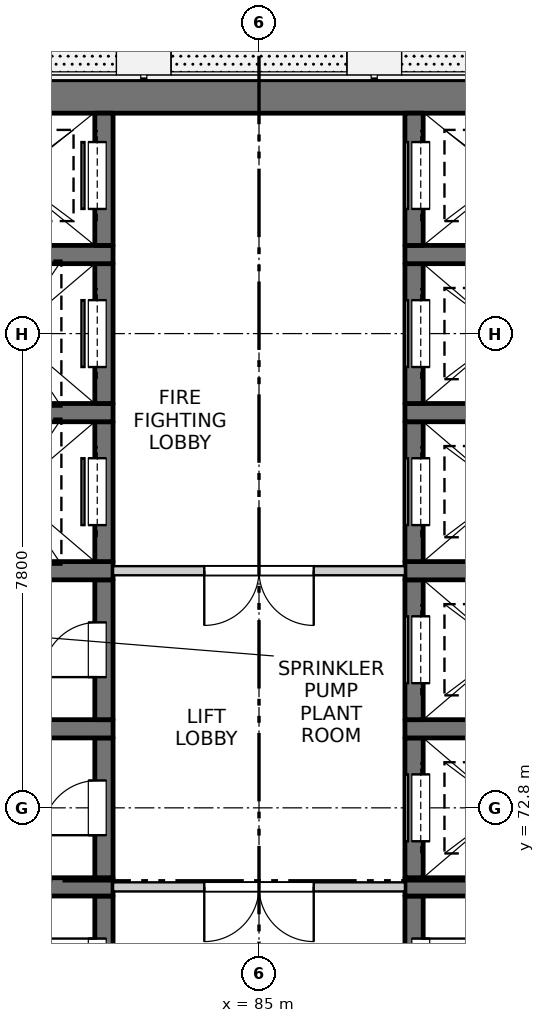
"""IFC4 building model, lengths in metres.
Left out: names, types, materials, properties, quantities, classifications, styles, units other than length and angle.
Written with IfcOpenShell. Run it as: python <this file> out.ifc"""

import sys

from ifc_helpers import new_model, si_unit, direction, frame, frame_2d, origin, place, context, subcontext, project, spatial, rectangle, extrude, element, fill, save


model = new_model("IFC4")
c1 = context("Model", 3, precision=1e-05, world=origin(), true_north=direction((0.0, 1.0)))
c2 = subcontext(c1, "Body", "Model", "MODEL_VIEW")
j1 = project(units=[si_unit("LENGTHUNIT", "METRE"), si_unit("PLANEANGLEUNIT", "RADIAN")], contexts=[c1])
p1 = place(None, origin())
s1 = spatial("IfcSite", under=j1, at=p1, CompositionType="ELEMENT")
p2 = place(p1, origin())
s2 = spatial("IfcBuilding", under=s1, at=p2, CompositionType="ELEMENT")
p3 = place(p2, frame((0.0, 0.0, 192.8)))
s3 = spatial("IfcBuildingStorey", under=s2, at=p3, CompositionType="ELEMENT", Elevation=192.8)
p4 = place(p3, frame((75.525, 84.5, -0.3), z_axis=(0.0, 0.0, 1.0), x_axis=(1.0, 0.0, 0.0)))
e1 = element("IfcWall", 1, at=p4, inside=s3, PredefinedType="SOLIDWALL", context=c2, shape_type="SweptSolid", body=[
    extrude(rectangle(XDim=18.95, YDim=0.55, at=frame_2d((9.475, 0.0))), origin(), (0.0, 0.0, 1.0), 4.5),
])
p5 = place(p3, frame((82.45, 69.05, -0.3), z_axis=(0.0, 0.0, 1.0), x_axis=(0.0, 1.0, 0.0)))
e2 = element("IfcWall", 2, at=p5, inside=s3, PredefinedType="SOLIDWALL", context=c2, shape_type="SweptSolid", body=[
    extrude(rectangle(XDim=2.3, YDim=0.3, at=frame_2d((1.15, 0.0))), origin(), (0.0, 0.0, 1.0), 4.5),
])
p6 = place(p5, frame((0.7, 0.0, 0.3)))
e3 = element("IfcOpeningElement", 3, at=p6, cuts=e2, PredefinedType="OPENING", context=c2, shape_type="SweptSolid", body=[
    extrude(rectangle(XDim=0.9, YDim=2.1, at=frame_2d((0.45, 1.05))), frame((0.0, 0.16, 0.0), z_axis=(0.0, -1.0, 0.0), x_axis=(1.0, 0.0, 0.0)), (0.0, 0.0, 1.0), 0.32),
])
p7 = place(p3, frame((79.6, 71.5, -0.3), z_axis=(0.0, 0.0, 1.0), x_axis=(1.0, 0.0, 0.0)))
e4 = element("IfcWall", 4, at=p7, inside=s3, PredefinedType="SOLIDWALL", context=c2, shape_type="SweptSolid", body=[
    extrude(rectangle(XDim=3.0, YDim=0.3, at=frame_2d((1.5, 0.0))), origin(), (0.0, 0.0, 1.0), 4.5),
])
p8 = place(p3, frame((82.45, 71.65, -0.3), z_axis=(0.0, 0.0, 1.0), x_axis=(0.0, 1.0, 0.0)))
e5 = element("IfcWall", 5, at=p8, inside=s3, PredefinedType="SOLIDWALL", context=c2, shape_type="SweptSolid", body=[
    extrude(rectangle(XDim=2.3, YDim=0.3, at=frame_2d((1.15, 0.0))), origin(), (0.0, 0.0, 1.0), 4.5),
])
p9 = place(p8, frame((0.7, 0.0, 0.3)))
e6 = element("IfcOpeningElement", 6, at=p9, cuts=e5, PredefinedType="OPENING", context=c2, shape_type="SweptSolid", body=[
    extrude(rectangle(XDim=0.9, YDim=2.1, at=frame_2d((0.45, 1.05))), frame((0.0, 0.16, 0.0), z_axis=(0.0, -1.0, 0.0), x_axis=(1.0, 0.0, 0.0)), (0.0, 0.0, 1.0), 0.32),
])
p10 = place(p3, frame((79.6, 74.1, -0.3), z_axis=(0.0, 0.0, 1.0), x_axis=(1.0, 0.0, 0.0)))
e7 = element("IfcWall", 7, at=p10, inside=s3, PredefinedType="SOLIDWALL", context=c2, shape_type="SweptSolid", body=[
    extrude(rectangle(XDim=3.0, YDim=0.3, at=frame_2d((1.5, 0.0))), origin(), (0.0, 0.0, 1.0), 4.5),
])
p11 = place(p3, frame((82.45, 74.25, -0.3), z_axis=(0.0, 0.0, 1.0), x_axis=(0.0, 1.0, 0.0)))
e8 = element("IfcWall", 8, at=p11, inside=s3, PredefinedType="SOLIDWALL", context=c2, shape_type="SweptSolid", body=[
    extrude(rectangle(XDim=2.3, YDim=0.3, at=frame_2d((1.15, 0.0))), origin(), (0.0, 0.0, 1.0), 4.5),
])
p12 = place(p11, frame((0.7, 0.0, 0.3)))
e9 = element("IfcOpeningElement", 9, at=p12, cuts=e8, PredefinedType="OPENING", context=c2, shape_type="SweptSolid", body=[
    extrude(rectangle(XDim=0.9, YDim=2.1, at=frame_2d((0.45, 1.05))), frame((0.0, 0.16, 0.0), z_axis=(0.0, -1.0, 0.0), x_axis=(1.0, 0.0, 0.0)), (0.0, 0.0, 1.0), 0.32),
])
p13 = place(p3, frame((79.6, 76.7, -0.3), z_axis=(0.0, 0.0, 1.0), x_axis=(1.0, 0.0, 0.0)))
e10 = element("IfcWall", 10, at=p13, inside=s3, PredefinedType="SOLIDWALL", context=c2, shape_type="SweptSolid", body=[
    extrude(rectangle(XDim=3.0, YDim=0.3, at=frame_2d((1.5, 0.0))), origin(), (0.0, 0.0, 1.0), 4.5),
])
p14 = place(p3, frame((82.45, 76.85, -0.3), z_axis=(0.0, 0.0, 1.0), x_axis=(0.0, 1.0, 0.0)))
e11 = element("IfcWall", 11, at=p14, inside=s3, PredefinedType="SOLIDWALL", context=c2, shape_type="SweptSolid", body=[
    extrude(rectangle(XDim=2.3, YDim=0.3, at=frame_2d((1.15, 0.0))), origin(), (0.0, 0.0, 1.0), 4.5),
])
p15 = place(p14, frame((0.6, 0.0, 0.3)))
e12 = element("IfcOpeningElement", 12, at=p15, cuts=e11, PredefinedType="OPENING", context=c2, shape_type="SweptSolid", body=[
    extrude(rectangle(XDim=1.1, YDim=2.1, at=frame_2d((0.55, 1.05))), frame((0.0, 0.16, 0.0), z_axis=(0.0, -1.0, 0.0), x_axis=(1.0, 0.0, 0.0)), (0.0, 0.0, 1.0), 0.32),
])
p16 = place(p3, frame((79.6, 79.3, -0.3), z_axis=(0.0, 0.0, 1.0), x_axis=(1.0, 0.0, 0.0)))
e13 = element("IfcWall", 13, at=p16, inside=s3, PredefinedType="SOLIDWALL", context=c2, shape_type="SweptSolid", body=[
    extrude(rectangle(XDim=3.0, YDim=0.3, at=frame_2d((1.5, 0.0))), origin(), (0.0, 0.0, 1.0), 4.5),
])
p17 = place(p3, frame((82.45, 79.45, -0.3), z_axis=(0.0, 0.0, 1.0), x_axis=(0.0, 1.0, 0.0)))
e14 = element("IfcWall", 14, at=p17, inside=s3, PredefinedType="SOLIDWALL", context=c2, shape_type="SweptSolid", body=[
    extrude(rectangle(XDim=2.3, YDim=0.3, at=frame_2d((1.15, 0.0))), origin(), (0.0, 0.0, 1.0), 4.5),
])
p18 = place(p17, frame((0.6, 0.0, 0.3)))
e15 = element("IfcOpeningElement", 15, at=p18, cuts=e14, PredefinedType="OPENING", context=c2, shape_type="SweptSolid", body=[
    extrude(rectangle(XDim=1.1, YDim=2.1, at=frame_2d((0.55, 1.05))), frame((0.0, 0.16, 0.0), z_axis=(0.0, -1.0, 0.0), x_axis=(1.0, 0.0, 0.0)), (0.0, 0.0, 1.0), 0.32),
])
p19 = place(p3, frame((79.6, 81.9, -0.3), z_axis=(0.0, 0.0, 1.0), x_axis=(1.0, 0.0, 0.0)))
e16 = element("IfcWall", 16, at=p19, inside=s3, PredefinedType="SOLIDWALL", context=c2, shape_type="SweptSolid", body=[
    extrude(rectangle(XDim=3.0, YDim=0.3, at=frame_2d((1.5, 0.0))), origin(), (0.0, 0.0, 1.0), 4.5),
])
p20 = place(p3, frame((82.45, 82.05, -0.3), z_axis=(0.0, 0.0, 1.0), x_axis=(0.0, 1.0, 0.0)))
e17 = element("IfcWall", 17, at=p20, inside=s3, PredefinedType="SOLIDWALL", context=c2, shape_type="SweptSolid", body=[
    extrude(rectangle(XDim=2.175, YDim=0.3, at=frame_2d((1.087, 0.0))), origin(), (0.0, 0.0, 1.0), 4.5),
])
p21 = place(p20, frame((0.6, 0.0, 0.3)))
e18 = element("IfcOpeningElement", 18, at=p21, cuts=e17, PredefinedType="OPENING", context=c2, shape_type="SweptSolid", body=[
    extrude(rectangle(XDim=1.1, YDim=2.1, at=frame_2d((0.55, 1.05))), frame((0.0, 0.16, 0.0), z_axis=(0.0, -1.0, 0.0), x_axis=(1.0, 0.0, 0.0)), (0.0, 0.0, 1.0), 0.32),
])
p22 = place(p3, frame((87.55, 69.05, -0.3), z_axis=(0.0, 0.0, 1.0), x_axis=(0.0, 1.0, 0.0)))
e19 = element("IfcWall", 19, at=p22, inside=s3, PredefinedType="SOLIDWALL", context=c2, shape_type="SweptSolid", body=[
    extrude(rectangle(XDim=2.3, YDim=0.3, at=frame_2d((1.15, 0.0))), origin(), (0.0, 0.0, 1.0), 4.5),
])
p23 = place(p22, frame((0.7, 0.0, 0.3)))
e20 = element("IfcOpeningElement", 20, at=p23, cuts=e19, PredefinedType="OPENING", context=c2, shape_type="SweptSolid", body=[
    extrude(rectangle(XDim=0.9, YDim=2.1, at=frame_2d((0.45, 1.05))), frame((0.0, 0.16, 0.0), z_axis=(0.0, -1.0, 0.0), x_axis=(1.0, 0.0, 0.0)), (0.0, 0.0, 1.0), 0.32),
])
p24 = place(p3, frame((87.4, 71.5, -0.3), z_axis=(0.0, 0.0, 1.0), x_axis=(1.0, 0.0, 0.0)))
e21 = element("IfcWall", 21, at=p24, inside=s3, PredefinedType="SOLIDWALL", context=c2, shape_type="SweptSolid", body=[
    extrude(rectangle(XDim=3.0, YDim=0.3, at=frame_2d((1.5, 0.0))), origin(), (0.0, 0.0, 1.0), 4.5),
])
p25 = place(p3, frame((87.55, 71.65, -0.3), z_axis=(0.0, 0.0, 1.0), x_axis=(0.0, 1.0, 0.0)))
e22 = element("IfcWall", 22, at=p25, inside=s3, PredefinedType="SOLIDWALL", context=c2, shape_type="SweptSolid", body=[
    extrude(rectangle(XDim=2.3, YDim=0.3, at=frame_2d((1.15, 0.0))), origin(), (0.0, 0.0, 1.0), 4.5),
])
p26 = place(p25, frame((0.6, 0.0, 0.3)))
e23 = element("IfcOpeningElement", 23, at=p26, cuts=e22, PredefinedType="OPENING", context=c2, shape_type="SweptSolid", body=[
    extrude(rectangle(XDim=1.1, YDim=2.1, at=frame_2d((0.55, 1.05))), frame((0.0, 0.16, 0.0), z_axis=(0.0, -1.0, 0.0), x_axis=(1.0, 0.0, 0.0)), (0.0, 0.0, 1.0), 0.32),
])
p27 = place(p3, frame((87.4, 74.1, -0.3), z_axis=(0.0, 0.0, 1.0), x_axis=(1.0, 0.0, 0.0)))
e24 = element("IfcWall", 24, at=p27, inside=s3, PredefinedType="SOLIDWALL", context=c2, shape_type="SweptSolid", body=[
    extrude(rectangle(XDim=3.0, YDim=0.3, at=frame_2d((1.5, 0.0))), origin(), (0.0, 0.0, 1.0), 4.5),
])
p28 = place(p3, frame((87.55, 74.25, -0.3), z_axis=(0.0, 0.0, 1.0), x_axis=(0.0, 1.0, 0.0)))
e25 = element("IfcWall", 25, at=p28, inside=s3, PredefinedType="SOLIDWALL", context=c2, shape_type="SweptSolid", body=[
    extrude(rectangle(XDim=2.3, YDim=0.3, at=frame_2d((1.15, 0.0))), origin(), (0.0, 0.0, 1.0), 4.5),
])
p29 = place(p28, frame((0.6, 0.0, 0.3)))
e26 = element("IfcOpeningElement", 26, at=p29, cuts=e25, PredefinedType="OPENING", context=c2, shape_type="SweptSolid", body=[
    extrude(rectangle(XDim=1.1, YDim=2.1, at=frame_2d((0.55, 1.05))), frame((0.0, 0.16, 0.0), z_axis=(0.0, -1.0, 0.0), x_axis=(1.0, 0.0, 0.0)), (0.0, 0.0, 1.0), 0.32),
])
p30 = place(p3, frame((87.4, 76.7, -0.3), z_axis=(0.0, 0.0, 1.0), x_axis=(1.0, 0.0, 0.0)))
e27 = element("IfcWall", 27, at=p30, inside=s3, PredefinedType="SOLIDWALL", context=c2, shape_type="SweptSolid", body=[
    extrude(rectangle(XDim=3.0, YDim=0.3, at=frame_2d((1.5, 0.0))), origin(), (0.0, 0.0, 1.0), 4.5),
])
p31 = place(p3, frame((87.55, 76.85, -0.3), z_axis=(0.0, 0.0, 1.0), x_axis=(0.0, 1.0, 0.0)))
e28 = element("IfcWall", 28, at=p31, inside=s3, PredefinedType="SOLIDWALL", context=c2, shape_type="SweptSolid", body=[
    extrude(rectangle(XDim=2.3, YDim=0.3, at=frame_2d((1.15, 0.0))), origin(), (0.0, 0.0, 1.0), 4.5),
])
p32 = place(p31, frame((0.6, 0.0, 0.3)))
e29 = element("IfcOpeningElement", 29, at=p32, cuts=e28, PredefinedType="OPENING", context=c2, shape_type="SweptSolid", body=[
    extrude(rectangle(XDim=1.1, YDim=2.1, at=frame_2d((0.55, 1.05))), frame((0.0, 0.16, 0.0), z_axis=(0.0, -1.0, 0.0), x_axis=(1.0, 0.0, 0.0)), (0.0, 0.0, 1.0), 0.32),
])
p33 = place(p3, frame((87.4, 79.3, -0.3), z_axis=(0.0, 0.0, 1.0), x_axis=(1.0, 0.0, 0.0)))
e30 = element("IfcWall", 30, at=p33, inside=s3, PredefinedType="SOLIDWALL", context=c2, shape_type="SweptSolid", body=[
    extrude(rectangle(XDim=3.0, YDim=0.3, at=frame_2d((1.5, 0.0))), origin(), (0.0, 0.0, 1.0), 4.5),
])
p34 = place(p3, frame((87.55, 79.45, -0.3), z_axis=(0.0, 0.0, 1.0), x_axis=(0.0, 1.0, 0.0)))
e31 = element("IfcWall", 31, at=p34, inside=s3, PredefinedType="SOLIDWALL", context=c2, shape_type="SweptSolid", body=[
    extrude(rectangle(XDim=2.3, YDim=0.3, at=frame_2d((1.15, 0.0))), origin(), (0.0, 0.0, 1.0), 4.5),
])
p35 = place(p34, frame((0.6, 0.0, 0.3)))
e32 = element("IfcOpeningElement", 32, at=p35, cuts=e31, PredefinedType="OPENING", context=c2, shape_type="SweptSolid", body=[
    extrude(rectangle(XDim=1.1, YDim=2.1, at=frame_2d((0.55, 1.05))), frame((0.0, 0.16, 0.0), z_axis=(0.0, -1.0, 0.0), x_axis=(1.0, 0.0, 0.0)), (0.0, 0.0, 1.0), 0.32),
])
p36 = place(p3, frame((87.4, 81.9, -0.3), z_axis=(0.0, 0.0, 1.0), x_axis=(1.0, 0.0, 0.0)))
e33 = element("IfcWall", 33, at=p36, inside=s3, PredefinedType="SOLIDWALL", context=c2, shape_type="SweptSolid", body=[
    extrude(rectangle(XDim=3.0, YDim=0.3, at=frame_2d((1.5, 0.0))), origin(), (0.0, 0.0, 1.0), 4.5),
])
p37 = place(p3, frame((87.55, 82.05, -0.3), z_axis=(0.0, 0.0, 1.0), x_axis=(0.0, 1.0, 0.0)))
e34 = element("IfcWall", 34, at=p37, inside=s3, PredefinedType="SOLIDWALL", context=c2, shape_type="SweptSolid", body=[
    extrude(rectangle(XDim=2.175, YDim=0.3, at=frame_2d((1.087, 0.0))), origin(), (0.0, 0.0, 1.0), 4.5),
])
p38 = place(p37, frame((0.6, 0.0, 0.3)))
e35 = element("IfcOpeningElement", 35, at=p38, cuts=e34, PredefinedType="OPENING", context=c2, shape_type="SweptSolid", body=[
    extrude(rectangle(XDim=1.1, YDim=2.1, at=frame_2d((0.55, 1.05))), frame((0.0, 0.16, 0.0), z_axis=(0.0, -1.0, 0.0), x_axis=(1.0, 0.0, 0.0)), (0.0, 0.0, 1.0), 0.32),
])
p39 = place(p3, frame((82.6, 71.5, 0.0), z_axis=(0.0, 0.0, 1.0), x_axis=(1.0, 0.0, 0.0)))
e36 = element("IfcWall", 36, at=p39, inside=s3, PredefinedType="PARTITIONING", context=c2, shape_type="SweptSolid", body=[
    extrude(rectangle(XDim=4.8, YDim=0.15, at=frame_2d((2.4, 0.0))), origin(), (0.0, 0.0, 1.0), 4.2),
])
p40 = place(p39, frame((1.5, 0.0, 0.0)))
e37 = element("IfcOpeningElement", 37, at=p40, cuts=e36, PredefinedType="OPENING", context=c2, shape_type="SweptSolid", body=[
    extrude(rectangle(XDim=1.8, YDim=2.1, at=frame_2d((0.9, 1.05))), frame((0.0, 0.085, 0.0), z_axis=(0.0, -1.0, 0.0), x_axis=(1.0, 0.0, 0.0)), (0.0, 0.0, 1.0), 0.17),
])
p41 = place(p3, frame((82.6, 76.7, 0.0), z_axis=(0.0, 0.0, 1.0), x_axis=(1.0, 0.0, 0.0)))
e38 = element("IfcWall", 38, at=p41, inside=s3, PredefinedType="PARTITIONING", context=c2, shape_type="SweptSolid", body=[
    extrude(rectangle(XDim=4.8, YDim=0.15, at=frame_2d((2.4, 0.0))), origin(), (0.0, 0.0, 1.0), 4.2),
])
p42 = place(p41, frame((1.5, 0.0, 0.0)))
e39 = element("IfcOpeningElement", 39, at=p42, cuts=e38, PredefinedType="OPENING", context=c2, shape_type="SweptSolid", body=[
    extrude(rectangle(XDim=1.8, YDim=2.1, at=frame_2d((0.9, 1.05))), frame((0.0, 0.085, 0.0), z_axis=(0.0, -1.0, 0.0), x_axis=(1.0, 0.0, 0.0)), (0.0, 0.0, 1.0), 0.17),
])
p43 = place(p6, origin())
e40 = element("IfcDoor", 40, at=p43, inside=s3, OperationType="SINGLE_SWING_RIGHT", PredefinedType="DOOR", context=c2, shape_type="SweptSolid", body=[
    extrude(rectangle(XDim=0.9, YDim=2.1, at=frame_2d((0.45, 1.05))), frame((0.0, 0.135, 0.0), z_axis=(0.0, -1.0, 0.0), x_axis=(1.0, 0.0, 0.0)), (0.0, 0.0, 1.0), 0.05),
])
fill(e3, e40)
p44 = place(p23, origin())
e41 = element("IfcDoor", 41, at=p44, inside=s3, OperationType="SINGLE_SWING_LEFT", PredefinedType="DOOR", context=c2, shape_type="SweptSolid", body=[
    extrude(rectangle(XDim=0.9, YDim=2.1, at=frame_2d((0.45, 1.05))), frame((0.0, -0.085, 0.0), z_axis=(0.0, -1.0, 0.0), x_axis=(1.0, 0.0, 0.0)), (0.0, 0.0, 1.0), 0.05),
])
fill(e20, e41)
p45 = place(p40, origin())
e42 = element("IfcDoor", 42, at=p45, inside=s3, OperationType="DOUBLE_DOOR_SINGLE_SWING", PredefinedType="DOOR", context=c2, shape_type="SweptSolid", body=[
    extrude(rectangle(XDim=1.8, YDim=2.1, at=frame_2d((0.9, 1.05))), frame((0.0, 0.025, 0.0), z_axis=(0.0, -1.0, 0.0), x_axis=(1.0, 0.0, 0.0)), (0.0, 0.0, 1.0), 0.05),
])
fill(e37, e42)
p46 = place(p9, origin())
e43 = element("IfcDoor", 43, at=p46, inside=s3, OperationType="SINGLE_SWING_LEFT", PredefinedType="DOOR", context=c2, shape_type="SweptSolid", body=[
    extrude(rectangle(XDim=0.9, YDim=2.1, at=frame_2d((0.45, 1.05))), frame((0.0, 0.135, 0.0), z_axis=(0.0, -1.0, 0.0), x_axis=(1.0, 0.0, 0.0)), (0.0, 0.0, 1.0), 0.05),
])
fill(e6, e43)
p47 = place(p26, origin())
e44 = element("IfcDoor", 44, at=p47, inside=s3, OperationType="SLIDING_TO_LEFT", PredefinedType="DOOR", context=c2, shape_type="SweptSolid", body=[
    extrude(rectangle(XDim=1.1, YDim=2.1, at=frame_2d((0.55, 1.05))), frame((0.0, -0.085, 0.0), z_axis=(0.0, -1.0, 0.0), x_axis=(1.0, 0.0, 0.0)), (0.0, 0.0, 1.0), 0.05),
])
fill(e23, e44)
p48 = place(p12, origin())
e45 = element("IfcDoor", 45, at=p48, inside=s3, OperationType="SINGLE_SWING_LEFT", PredefinedType="DOOR", context=c2, shape_type="SweptSolid", body=[
    extrude(rectangle(XDim=0.9, YDim=2.1, at=frame_2d((0.45, 1.05))), frame((0.0, 0.135, 0.0), z_axis=(0.0, -1.0, 0.0), x_axis=(1.0, 0.0, 0.0)), (0.0, 0.0, 1.0), 0.05),
])
fill(e9, e45)
p49 = place(p29, origin())
e46 = element("IfcDoor", 46, at=p49, inside=s3, OperationType="SLIDING_TO_LEFT", PredefinedType="DOOR", context=c2, shape_type="SweptSolid", body=[
    extrude(rectangle(XDim=1.1, YDim=2.1, at=frame_2d((0.55, 1.05))), frame((0.0, -0.085, 0.0), z_axis=(0.0, -1.0, 0.0), x_axis=(1.0, 0.0, 0.0)), (0.0, 0.0, 1.0), 0.05),
])
fill(e26, e46)
p50 = place(p42, origin())
e47 = element("IfcDoor", 47, at=p50, inside=s3, OperationType="DOUBLE_DOOR_SINGLE_SWING", PredefinedType="DOOR", context=c2, shape_type="SweptSolid", body=[
    extrude(rectangle(XDim=1.8, YDim=2.1, at=frame_2d((0.9, 1.05))), frame((0.0, 0.025, 0.0), z_axis=(0.0, -1.0, 0.0), x_axis=(1.0, 0.0, 0.0)), (0.0, 0.0, 1.0), 0.05),
])
fill(e39, e47)
p51 = place(p15, origin())
e48 = element("IfcDoor", 48, at=p51, inside=s3, OperationType="SLIDING_TO_LEFT", PredefinedType="DOOR", context=c2, shape_type="SweptSolid", body=[
    extrude(rectangle(XDim=1.1, YDim=2.1, at=frame_2d((0.55, 1.05))), frame((0.0, 0.135, 0.0), z_axis=(0.0, -1.0, 0.0), x_axis=(1.0, 0.0, 0.0)), (0.0, 0.0, 1.0), 0.05),
])
fill(e12, e48)
p52 = place(p32, origin())
e49 = element("IfcDoor", 49, at=p52, inside=s3, OperationType="SLIDING_TO_LEFT", PredefinedType="DOOR", context=c2, shape_type="SweptSolid", body=[
    extrude(rectangle(XDim=1.1, YDim=2.1, at=frame_2d((0.55, 1.05))), frame((0.0, -0.085, 0.0), z_axis=(0.0, -1.0, 0.0), x_axis=(1.0, 0.0, 0.0)), (0.0, 0.0, 1.0), 0.05),
])
fill(e29, e49)
p53 = place(p18, origin())
e50 = element("IfcDoor", 50, at=p53, inside=s3, OperationType="SLIDING_TO_LEFT", PredefinedType="DOOR", context=c2, shape_type="SweptSolid", body=[
    extrude(rectangle(XDim=1.1, YDim=2.1, at=frame_2d((0.55, 1.05))), frame((0.0, 0.135, 0.0), z_axis=(0.0, -1.0, 0.0), x_axis=(1.0, 0.0, 0.0)), (0.0, 0.0, 1.0), 0.05),
])
fill(e15, e50)
p54 = place(p35, origin())
e51 = element("IfcDoor", 51, at=p54, inside=s3, OperationType="SLIDING_TO_RIGHT", PredefinedType="DOOR", context=c2, shape_type="SweptSolid", body=[
    extrude(rectangle(XDim=1.1, YDim=2.1, at=frame_2d((0.55, 1.05))), frame((0.0, -0.085, 0.0), z_axis=(0.0, -1.0, 0.0), x_axis=(1.0, 0.0, 0.0)), (0.0, 0.0, 1.0), 0.05),
])
fill(e32, e51)
p55 = place(p21, origin())
e52 = element("IfcDoor", 52, at=p55, inside=s3, OperationType="SLIDING_TO_RIGHT", PredefinedType="DOOR", context=c2, shape_type="SweptSolid", body=[
    extrude(rectangle(XDim=1.1, YDim=2.1, at=frame_2d((0.55, 1.05))), frame((0.0, 0.135, 0.0), z_axis=(0.0, -1.0, 0.0), x_axis=(1.0, 0.0, 0.0)), (0.0, 0.0, 1.0), 0.05),
])
fill(e18, e52)
p56 = place(p38, origin())
e53 = element("IfcDoor", 53, at=p56, inside=s3, OperationType="SLIDING_TO_RIGHT", PredefinedType="DOOR", context=c2, shape_type="SweptSolid", body=[
    extrude(rectangle(XDim=1.1, YDim=2.1, at=frame_2d((0.55, 1.05))), frame((0.0, -0.085, 0.0), z_axis=(0.0, -1.0, 0.0), x_axis=(1.0, 0.0, 0.0)), (0.0, 0.0, 1.0), 0.05),
])
fill(e35, e53)
save(model, sys.argv[1])
